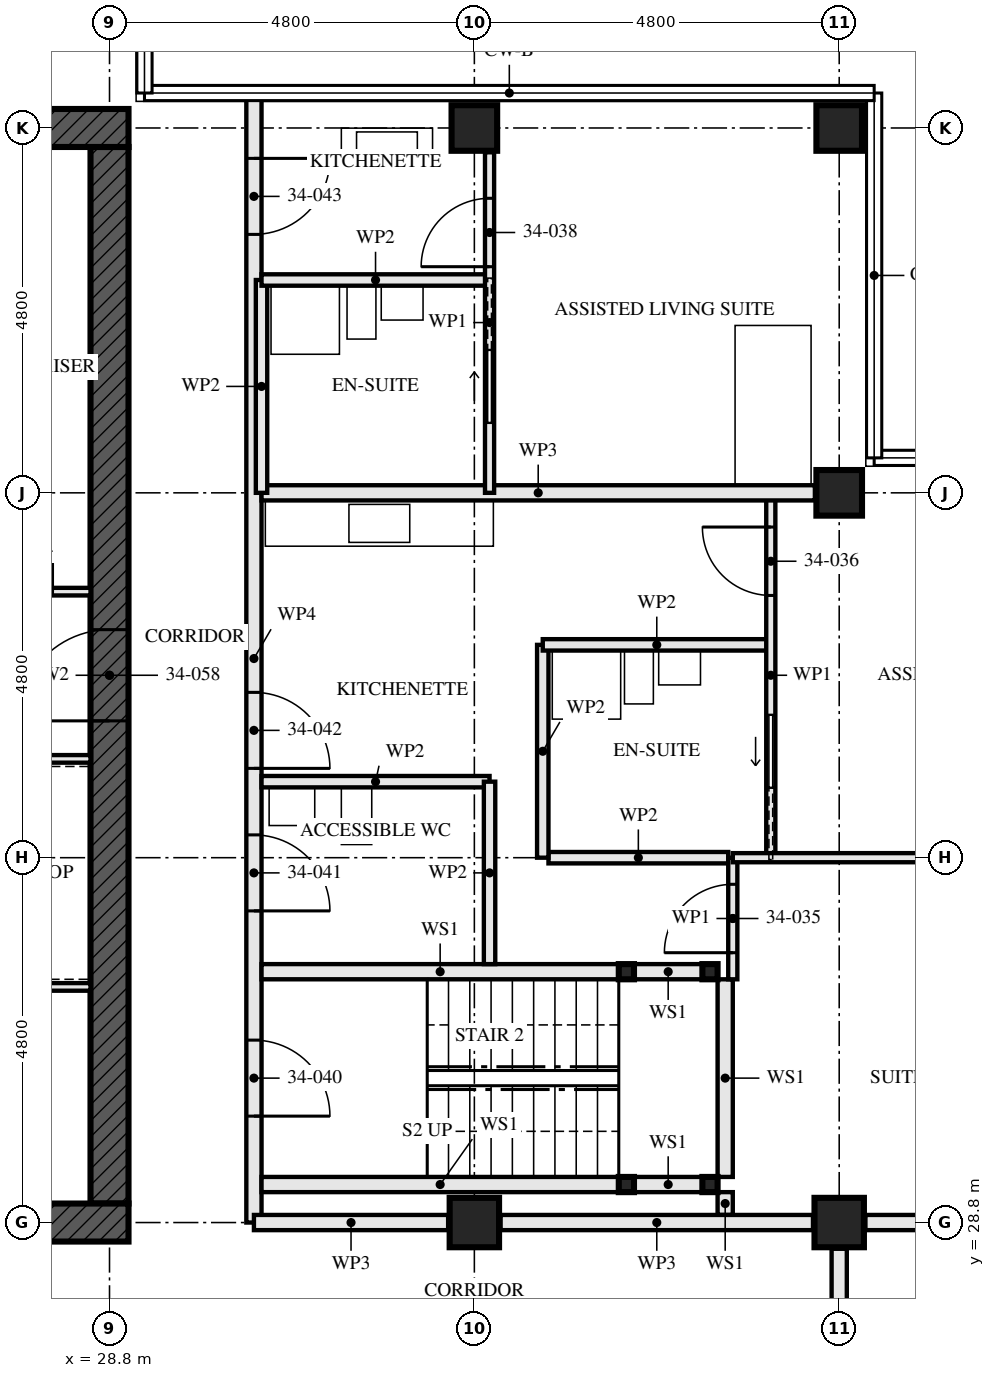
"""IFC4 building model, lengths in metres.
Left out: names, types, materials, properties, quantities, classifications, styles, units other than length and angle.
Written with IfcOpenShell. Run it as: python <this file> out.ifc"""

import sys

from ifc_helpers import new_model, si_unit, direction, frame, frame_2d, origin, origin_2d, place, context, subcontext, project, spatial, rectangle, hollow_rectangle, extrude, element, fill, save


model = new_model("IFC4")
c1 = context("Model", 3, precision=1e-05, world=origin(), true_north=direction((0.0, 1.0)))
c2 = subcontext(c1, "Body", "Model", "MODEL_VIEW")
j1 = project(units=[si_unit("LENGTHUNIT", "METRE"), si_unit("PLANEANGLEUNIT", "RADIAN")], contexts=[c1])
p1 = place(None, origin())
s1 = spatial("IfcSite", under=j1, at=p1, CompositionType="ELEMENT")
p2 = place(p1, origin())
s2 = spatial("IfcBuilding", under=s1, at=p2, CompositionType="ELEMENT")
p3 = place(p2, frame((0.0, 0.0, 126.0)))
s3 = spatial("IfcBuildingStorey", under=s2, at=p3, CompositionType="ELEMENT", Elevation=126.0)
p4 = place(p3, frame((33.6, 28.8, 0.0), z_axis=(0.0, 0.0, 1.0), x_axis=(0.0, 1.0, 0.0)))
e1 = element("IfcColumn", 1, at=p4, inside=s3, PredefinedType="COLUMN", context=c2, shape_type="SweptSolid", body=[
    extrude(hollow_rectangle(XDim=0.65, YDim=0.65, WallThickness=0.05, at=origin_2d()), origin(), (0.0, 0.0, 1.0), 3.5),
])
p5 = place(p3, frame((33.6, 43.2, 0.0), z_axis=(0.0, 0.0, 1.0), x_axis=(0.0, 1.0, 0.0)))
e2 = element("IfcColumn", 2, at=p5, inside=s3, PredefinedType="COLUMN", context=c2, shape_type="SweptSolid", body=[
    extrude(hollow_rectangle(XDim=0.6, YDim=0.6, WallThickness=0.08, at=origin_2d()), origin(), (0.0, 0.0, 1.0), 3.5),
])
p6 = place(p3, frame((38.4, 28.8, 0.0), z_axis=(0.0, 0.0, 1.0), x_axis=(0.0, 1.0, 0.0)))
e3 = element("IfcColumn", 3, at=p6, inside=s3, PredefinedType="COLUMN", context=c2, shape_type="SweptSolid", body=[
    extrude(hollow_rectangle(XDim=0.65, YDim=0.65, WallThickness=0.05, at=origin_2d()), origin(), (0.0, 0.0, 1.0), 3.5),
])
for number, where, z_axis, x_axis in (
    (4, (38.4, 38.4, 0.0), (0.0, 0.0, 1.0), (0.0, 1.0, 0.0)),
    (5, (38.4, 43.2, 0.0), (0.0, 0.0, 1.0), (0.0, 1.0, 0.0)),
):
    element("IfcColumn", number, at=place(p3, frame(where, z_axis=z_axis, x_axis=x_axis)), inside=s3, PredefinedType="COLUMN", context=c2, shape_type="SweptSolid", body=[
        extrude(hollow_rectangle(XDim=0.6, YDim=0.6, WallThickness=0.08, at=origin_2d()), origin(), (0.0, 0.0, 1.0), 3.5),
    ])
p7 = place(p3, frame((14.15, 28.8, -0.17), z_axis=(0.0, 0.0, 1.0), x_axis=(1.0, 0.0, 0.0)))
e6 = element("IfcWall", 6, at=p7, inside=s3, PredefinedType="SHEAR", context=c2, shape_type="SweptSolid", body=[
    extrude(rectangle(XDim=14.9, YDim=0.5, at=frame_2d((7.45, 0.0))), origin(), (0.0, 0.0, 1.0), 3.5),
])
p8 = place(p7, frame((6.85, 0.0, 0.17)))
e7 = element("IfcOpeningElement", 7, at=p8, cuts=e6, PredefinedType="OPENING", context=c2, shape_type="SweptSolid", body=[
    extrude(rectangle(XDim=1.2, YDim=2.1, at=frame_2d((0.6, 1.05))), frame((0.0, 0.26, 0.0), z_axis=(0.0, -1.0, 0.0), x_axis=(1.0, 0.0, 0.0)), (0.0, 0.0, 1.0), 0.521),
])
p9 = place(p3, frame((29.05, 43.2, -0.17), z_axis=(0.0, 0.0, 1.0), x_axis=(-1.0, 0.0, 0.0)))
e8 = element("IfcWall", 8, at=p9, inside=s3, PredefinedType="SHEAR", context=c2, shape_type="SweptSolid", body=[
    extrude(rectangle(XDim=14.9, YDim=0.5, at=frame_2d((7.45, 0.0))), origin(), (0.0, 0.0, 1.0), 3.5),
])
p10 = place(p9, frame((6.85, 0.0, 0.17)))
e9 = element("IfcOpeningElement", 9, at=p10, cuts=e8, PredefinedType="OPENING", context=c2, shape_type="SweptSolid", body=[
    extrude(rectangle(XDim=1.2, YDim=2.1, at=frame_2d((0.6, 1.05))), frame((0.0, 0.26, 0.0), z_axis=(0.0, -1.0, 0.0), x_axis=(1.0, 0.0, 0.0)), (0.0, 0.0, 1.0), 0.521),
])
p11 = place(p3, frame((28.8, 29.05, -0.17), z_axis=(0.0, 0.0, 1.0), x_axis=(0.0, 1.0, 0.0)))
e10 = element("IfcWall", 10, at=p11, inside=s3, PredefinedType="SHEAR", context=c2, shape_type="SweptSolid", body=[
    extrude(rectangle(XDim=13.9, YDim=0.5, at=frame_2d((6.95, 0.0))), origin(), (0.0, 0.0, 1.0), 3.5),
])
p12 = place(p11, frame((6.35, 0.0, 0.17)))
e11 = element("IfcOpeningElement", 11, at=p12, cuts=e10, PredefinedType="OPENING", context=c2, shape_type="SweptSolid", body=[
    extrude(rectangle(XDim=1.2, YDim=2.1, at=frame_2d((0.6, 1.05))), frame((0.0, 0.26, 0.0), z_axis=(0.0, -1.0, 0.0), x_axis=(1.0, 0.0, 0.0)), (0.0, 0.0, 1.0), 0.521),
])
for number, where, z_axis, x_axis in (
    (12, (36.7, 29.3, 0.0), (0.0, 0.0, 1.0), (1.0, 0.0, 0.0)),
    (13, (36.7, 32.1, 0.0), (0.0, 0.0, 1.0), (1.0, 0.0, 0.0)),
    (14, (35.6, 29.3, 0.0), (0.0, 0.0, 1.0), (1.0, 0.0, 0.0)),
    (15, (35.6, 32.1, 0.0), (0.0, 0.0, 1.0), (1.0, 0.0, 0.0)),
):
    element("IfcColumn", number, at=place(p3, frame(where, z_axis=z_axis, x_axis=x_axis)), inside=s3, PredefinedType="COLUMN", context=c2, shape_type="SweptSolid", body=[
        extrude(hollow_rectangle(XDim=0.2, YDim=0.2, WallThickness=0.008, at=origin_2d()), origin(), (0.0, 0.0, 1.0), 3.33),
    ])
p13 = place(p3, frame((38.4, 26.8, 0.0), z_axis=(0.0, 0.0, 1.0), x_axis=(0.0, 1.0, 0.0)))
e16 = element("IfcWall", 16, at=p13, inside=s3, PredefinedType="PARTITIONING", context=c2, shape_type="SweptSolid", body=[
    extrude(rectangle(XDim=1.655, YDim=0.2, at=frame_2d((0.828, 0.0))), origin(), (0.0, 0.0, 1.0), 3.33),
])
p14 = place(p3, frame((36.6, 29.3, 0.0), z_axis=(0.0, 0.0, 1.0), x_axis=(-1.0, 0.0, 0.0)))
e17 = element("IfcWall", 17, at=p14, inside=s3, PredefinedType="SOLIDWALL", context=c2, shape_type="SweptSolid", body=[
    extrude(rectangle(XDim=0.9, YDim=0.2, at=frame_2d((0.45, 0.0))), origin(), (0.0, 0.0, 1.0), 2.99),
])
p15 = place(p3, frame((35.5, 29.3, 0.0), z_axis=(0.0, 0.0, 1.0), x_axis=(-1.0, 0.0, 0.0)))
e18 = element("IfcWall", 18, at=p15, inside=s3, PredefinedType="SOLIDWALL", context=c2, shape_type="SweptSolid", body=[
    extrude(rectangle(XDim=4.7, YDim=0.2, at=frame_2d((2.35, 0.0))), origin(), (0.0, 0.0, 1.0), 2.99),
])
p16 = place(p3, frame((36.6, 32.1, 0.0), z_axis=(0.0, 0.0, 1.0), x_axis=(-1.0, 0.0, 0.0)))
e19 = element("IfcWall", 19, at=p16, inside=s3, PredefinedType="SOLIDWALL", context=c2, shape_type="SweptSolid", body=[
    extrude(rectangle(XDim=0.9, YDim=0.2, at=frame_2d((0.45, 0.0))), origin(), (0.0, 0.0, 1.0), 2.99),
])
p17 = place(p3, frame((35.5, 32.1, 0.0), z_axis=(0.0, 0.0, 1.0), x_axis=(-1.0, 0.0, 0.0)))
e20 = element("IfcWall", 20, at=p17, inside=s3, PredefinedType="SOLIDWALL", context=c2, shape_type="SweptSolid", body=[
    extrude(rectangle(XDim=4.7, YDim=0.2, at=frame_2d((2.35, 0.0))), origin(), (0.0, 0.0, 1.0), 2.99),
])
p18 = place(p3, frame((36.9, 28.9, 0.0), z_axis=(0.0, 0.0, 1.0), x_axis=(0.0, 1.0, 0.0)))
e21 = element("IfcWall", 21, at=p18, inside=s3, PredefinedType="SOLIDWALL", context=c2, shape_type="SweptSolid", body=[
    extrude(rectangle(XDim=0.3, YDim=0.2, at=frame_2d((0.15, 0.0))), origin(), (0.0, 0.0, 1.0), 3.33),
])
p19 = place(p3, frame((36.9, 29.4, 0.0), z_axis=(0.0, 0.0, 1.0), x_axis=(0.0, 1.0, 0.0)))
e22 = element("IfcWall", 22, at=p19, inside=s3, PredefinedType="SOLIDWALL", context=c2, shape_type="SweptSolid", body=[
    extrude(rectangle(XDim=2.6, YDim=0.2, at=frame_2d((1.3, 0.0))), origin(), (0.0, 0.0, 1.0), 3.33),
])
p20 = place(p3, frame((33.8, 32.2, 0.0), z_axis=(0.0, 0.0, 1.0), x_axis=(0.0, 1.0, 0.0)))
e23 = element("IfcWall", 23, at=p20, inside=s3, PredefinedType="PARTITIONING", context=c2, shape_type="SweptSolid", body=[
    extrude(rectangle(XDim=2.4, YDim=0.15, at=frame_2d((1.2, 0.0))), origin(), (0.0, 0.0, 1.0), 2.55),
])
for number, where, z_axis, x_axis in (
    (24, (33.8, 34.6, 0.0), (0.0, 0.0, 1.0), (-1.0, 0.0, 0.0)),
    (25, (37.5, 36.4, 0.0), (0.0, 0.0, 1.0), (-1.0, 0.0, 0.0)),
):
    element("IfcWall", number, at=place(p3, frame(where, z_axis=z_axis, x_axis=x_axis)), inside=s3, PredefinedType="PARTITIONING", context=c2, shape_type="SweptSolid", body=[
        extrude(rectangle(XDim=3.0, YDim=0.15, at=frame_2d((1.5, 0.0))), origin(), (0.0, 0.0, 1.0), 3.33),
    ])
p21 = place(p3, frame((34.5, 33.6, 0.0), z_axis=(0.0, 0.0, 1.0), x_axis=(0.0, 1.0, 0.0)))
e26 = element("IfcWall", 26, at=p21, inside=s3, PredefinedType="PARTITIONING", context=c2, shape_type="SweptSolid", body=[
    extrude(rectangle(XDim=2.8, YDim=0.15, at=frame_2d((1.4, 0.0))), origin(), (0.0, 0.0, 1.0), 3.33),
])
p22 = place(p3, frame((37.0, 32.0, 0.0), z_axis=(0.0, 0.0, 1.0), x_axis=(0.0, 1.0, 0.0)))
e27 = element("IfcWall", 27, at=p22, inside=s3, PredefinedType="PARTITIONING", context=c2, shape_type="SweptSolid", body=[
    extrude(rectangle(XDim=1.6, YDim=0.12, at=frame_2d((0.8, 0.0))), origin(), (0.0, 0.0, 1.0), 3.33),
])
p23 = place(p22, frame((0.35, 0.0, 0.0)))
e28 = element("IfcOpeningElement", 28, at=p23, cuts=e27, PredefinedType="OPENING", context=c2, shape_type="SweptSolid", body=[
    extrude(rectangle(XDim=0.9, YDim=2.1, at=frame_2d((0.45, 1.05))), frame((0.0, 0.071, 0.0), z_axis=(0.0, -1.0, 0.0), x_axis=(1.0, 0.0, 0.0)), (0.0, 0.0, 1.0), 0.141),
])
p24 = place(p3, frame((37.5, 33.6, 0.0), z_axis=(0.0, 0.0, 1.0), x_axis=(0.0, 1.0, 0.0)))
e29 = element("IfcWall", 29, at=p24, inside=s3, PredefinedType="PARTITIONING", context=c2, shape_type="SweptSolid", body=[
    extrude(rectangle(XDim=4.8, YDim=0.12, at=frame_2d((2.4, 0.0))), origin(), (0.0, 0.0, 1.0), 3.33),
])
p25 = place(p24, frame((3.45, 0.0, 0.0)))
e30 = element("IfcOpeningElement", 30, at=p25, cuts=e29, PredefinedType="OPENING", context=c2, shape_type="SweptSolid", body=[
    extrude(rectangle(XDim=0.9, YDim=2.1, at=frame_2d((0.45, 1.05))), frame((0.0, 0.071, 0.0), z_axis=(0.0, -1.0, 0.0), x_axis=(1.0, 0.0, 0.0)), (0.0, 0.0, 1.0), 0.141),
])
p26 = place(p24, frame((0.925, 0.0, 0.0)))
e31 = element("IfcOpeningElement", 31, at=p26, cuts=e29, PredefinedType="OPENING", context=c2, shape_type="SweptSolid", body=[
    extrude(rectangle(XDim=0.95, YDim=2.1, at=frame_2d((0.475, 1.05))), frame((0.0, 0.071, 0.0), z_axis=(0.0, -1.0, 0.0), x_axis=(1.0, 0.0, 0.0)), (0.0, 0.0, 1.0), 0.141),
])
p27 = place(p3, frame((42.88, 33.6, 0.0), z_axis=(0.0, 0.0, 1.0), x_axis=(-1.0, 0.0, 0.0)))
e32 = element("IfcWall", 32, at=p27, inside=s3, PredefinedType="PARTITIONING", context=c2, shape_type="SweptSolid", body=[
    extrude(rectangle(XDim=5.88, YDim=0.12, at=frame_2d((2.94, 0.0))), origin(), (0.0, 0.0, 1.0), 2.55),
])
p28 = place(p3, frame((38.08, 38.4, 0.0), z_axis=(0.0, 0.0, 1.0), x_axis=(-1.0, 0.0, 0.0)))
e33 = element("IfcWall", 33, at=p28, inside=s3, PredefinedType="PARTITIONING", context=c2, shape_type="SweptSolid", body=[
    extrude(rectangle(XDim=7.28, YDim=0.2, at=frame_2d((3.64, 0.0))), origin(), (0.0, 0.0, 1.0), 2.55),
])
p29 = place(p3, frame((33.8, 41.2, 0.0), z_axis=(0.0, 0.0, 1.0), x_axis=(-1.0, 0.0, 0.0)))
e34 = element("IfcWall", 34, at=p29, inside=s3, PredefinedType="PARTITIONING", context=c2, shape_type="SweptSolid", body=[
    extrude(rectangle(XDim=3.0, YDim=0.15, at=frame_2d((1.5, 0.0))), origin(), (0.0, 0.0, 1.0), 3.33),
])
p30 = place(p3, frame((30.8, 38.4, 0.0), z_axis=(0.0, 0.0, 1.0), x_axis=(0.0, 1.0, 0.0)))
e35 = element("IfcWall", 35, at=p30, inside=s3, PredefinedType="PARTITIONING", context=c2, shape_type="SweptSolid", body=[
    extrude(rectangle(XDim=2.8, YDim=0.15, at=frame_2d((1.4, 0.0))), origin(), (0.0, 0.0, 1.0), 3.33),
])
p31 = place(p3, frame((33.8, 38.4, 0.0), z_axis=(0.0, 0.0, 1.0), x_axis=(0.0, 1.0, 0.0)))
e36 = element("IfcWall", 36, at=p31, inside=s3, PredefinedType="PARTITIONING", context=c2, shape_type="SweptSolid", body=[
    extrude(rectangle(XDim=4.48, YDim=0.12, at=frame_2d((2.24, 0.0))), origin(), (0.0, 0.0, 1.0), 3.33),
])
p32 = place(p31, frame((2.975, 0.0, 0.0)))
e37 = element("IfcOpeningElement", 37, at=p32, cuts=e36, PredefinedType="OPENING", context=c2, shape_type="SweptSolid", body=[
    extrude(rectangle(XDim=0.9, YDim=2.1, at=frame_2d((0.45, 1.05))), frame((0.0, 0.071, 0.0), z_axis=(0.0, -1.0, 0.0), x_axis=(1.0, 0.0, 0.0)), (0.0, 0.0, 1.0), 0.141),
])
p33 = place(p31, frame((0.925, 0.0, 0.0)))
e38 = element("IfcOpeningElement", 38, at=p33, cuts=e36, PredefinedType="OPENING", context=c2, shape_type="SweptSolid", body=[
    extrude(rectangle(XDim=0.95, YDim=2.1, at=frame_2d((0.475, 1.05))), frame((0.0, 0.071, 0.0), z_axis=(0.0, -1.0, 0.0), x_axis=(1.0, 0.0, 0.0)), (0.0, 0.0, 1.0), 0.141),
])
p34 = place(p3, frame((30.7, 28.8, 0.0), z_axis=(0.0, 0.0, 1.0), x_axis=(0.0, 1.0, 0.0)))
e39 = element("IfcWall", 39, at=p34, inside=s3, PredefinedType="PARTITIONING", context=c2, shape_type="SweptSolid", body=[
    extrude(rectangle(XDim=14.84, YDim=0.2, at=frame_2d((7.42, 0.0))), origin(), (0.0, 0.0, 1.0), 2.32),
])
p35 = place(p34, frame((1.4, 0.0, 0.0)))
e40 = element("IfcOpeningElement", 40, at=p35, cuts=e39, PredefinedType="OPENING", context=c2, shape_type="SweptSolid", body=[
    extrude(rectangle(XDim=1.0, YDim=2.1, at=frame_2d((0.5, 1.05))), frame((0.0, 0.111, 0.0), z_axis=(0.0, -1.0, 0.0), x_axis=(1.0, 0.0, 0.0)), (0.0, 0.0, 1.0), 0.221),
])
p36 = place(p34, frame((4.1, 0.0, 0.0)))
e41 = element("IfcOpeningElement", 41, at=p36, cuts=e39, PredefinedType="OPENING", context=c2, shape_type="SweptSolid", body=[
    extrude(rectangle(XDim=1.0, YDim=2.1, at=frame_2d((0.5, 1.05))), frame((0.0, 0.111, 0.0), z_axis=(0.0, -1.0, 0.0), x_axis=(1.0, 0.0, 0.0)), (0.0, 0.0, 1.0), 0.221),
])
p37 = place(p34, frame((5.975, 0.0, 0.0)))
e42 = element("IfcOpeningElement", 42, at=p37, cuts=e39, PredefinedType="OPENING", context=c2, shape_type="SweptSolid", body=[
    extrude(rectangle(XDim=1.0, YDim=2.1, at=frame_2d((0.5, 1.05))), frame((0.0, 0.111, 0.0), z_axis=(0.0, -1.0, 0.0), x_axis=(1.0, 0.0, 0.0)), (0.0, 0.0, 1.0), 0.221),
])
p38 = place(p34, frame((13.0, 0.0, 0.0)))
e43 = element("IfcOpeningElement", 43, at=p38, cuts=e39, PredefinedType="OPENING", context=c2, shape_type="SweptSolid", body=[
    extrude(rectangle(XDim=1.0, YDim=2.1, at=frame_2d((0.5, 1.05))), frame((0.0, 0.111, 0.0), z_axis=(0.0, -1.0, 0.0), x_axis=(1.0, 0.0, 0.0)), (0.0, 0.0, 1.0), 0.221),
])
p39 = place(p3, frame((23.05, 34.9, 0.0), z_axis=(0.0, 0.0, 1.0), x_axis=(1.0, 0.0, 0.0)))
e44 = element("IfcWall", 44, at=p39, inside=s3, PredefinedType="SOLIDWALL", context=c2, shape_type="SweptSolid", body=[
    extrude(rectangle(XDim=5.5, YDim=0.1, at=frame_2d((2.75, 0.0))), origin(), (0.0, 0.0, 1.0), 3.33),
])
p40 = place(p3, frame((22.65, 37.1, 0.0), z_axis=(0.0, 0.0, 1.0), x_axis=(1.0, 0.0, 0.0)))
e45 = element("IfcWall", 45, at=p40, inside=s3, PredefinedType="SOLIDWALL", context=c2, shape_type="SweptSolid", body=[
    extrude(rectangle(XDim=5.9, YDim=0.1, at=frame_2d((2.95, 0.0))), origin(), (0.0, 0.0, 1.0), 3.33),
])
p41 = place(p40, frame((3.1, 0.0, 0.0)))
e46 = element("IfcOpeningElement", 46, at=p41, cuts=e45, PredefinedType="OPENING", context=c2, shape_type="SweptSolid", body=[
    extrude(rectangle(XDim=1.0, YDim=2.1, at=frame_2d((0.5, 1.05))), frame((0.0, 0.061, 0.0), z_axis=(0.0, -1.0, 0.0), x_axis=(1.0, 0.0, 0.0)), (0.0, 0.0, 1.0), 0.121),
])
p42 = place(p40, frame((4.7, 0.0, 0.0)))
e47 = element("IfcOpeningElement", 47, at=p42, cuts=e45, PredefinedType="OPENING", context=c2, shape_type="SweptSolid", body=[
    extrude(rectangle(XDim=0.7, YDim=2.1, at=frame_2d((0.35, 1.05))), frame((0.0, 0.061, 0.0), z_axis=(0.0, -1.0, 0.0), x_axis=(1.0, 0.0, 0.0)), (0.0, 0.0, 1.0), 0.121),
])
p43 = place(p3, frame((23.15, 31.9, 0.0), z_axis=(0.0, 0.0, 1.0), x_axis=(1.0, 0.0, 0.0)))
e48 = element("IfcWall", 48, at=p43, inside=s3, PredefinedType="SOLIDWALL", context=c2, shape_type="SweptSolid", body=[
    extrude(rectangle(XDim=5.4, YDim=0.1, at=frame_2d((2.7, 0.0))), origin(), (0.0, 0.0, 1.0), 3.33),
])
p44 = place(p3, frame((42.88, 28.8, 0.0), z_axis=(0.0, 0.0, 1.0), x_axis=(-1.0, 0.0, 0.0)))
e49 = element("IfcWall", 49, at=p44, inside=s3, PredefinedType="PARTITIONING", context=c2, shape_type="SweptSolid", body=[
    extrude(rectangle(XDim=4.135, YDim=0.2, at=frame_2d((2.067, 0.0))), origin(), (0.0, 0.0, 1.0), 2.32),
])
p45 = place(p3, frame((38.055, 28.8, 0.0), z_axis=(0.0, 0.0, 1.0), x_axis=(-1.0, 0.0, 0.0)))
e50 = element("IfcWall", 50, at=p45, inside=s3, PredefinedType="PARTITIONING", context=c2, shape_type="SweptSolid", body=[
    extrude(rectangle(XDim=4.11, YDim=0.2, at=frame_2d((2.055, 0.0))), origin(), (0.0, 0.0, 1.0), 2.32),
])
p46 = place(p3, frame((33.255, 28.8, 0.0), z_axis=(0.0, 0.0, 1.0), x_axis=(-1.0, 0.0, 0.0)))
e51 = element("IfcWall", 51, at=p46, inside=s3, PredefinedType="PARTITIONING", context=c2, shape_type="SweptSolid", body=[
    extrude(rectangle(XDim=2.555, YDim=0.2, at=frame_2d((1.277, 0.0))), origin(), (0.0, 0.0, 1.0), 2.32),
])
p47 = place(p3, frame((36.94, 33.6, 0.0), z_axis=(0.0, 0.0, 1.0), x_axis=(-1.0, 0.0, 0.0)))
e52 = element("IfcWall", 52, at=p47, inside=s3, PredefinedType="PARTITIONING", context=c2, shape_type="SweptSolid", body=[
    extrude(rectangle(XDim=2.365, YDim=0.15, at=frame_2d((1.183, 0.0))), origin(), (0.0, 0.0, 1.0), 2.55),
])
p48 = place(p23, origin())
e53 = element("IfcDoor", 53, at=p48, inside=s3, OperationType="SINGLE_SWING_RIGHT", PredefinedType="DOOR", context=c2, shape_type="SweptSolid", body=[
    extrude(rectangle(XDim=0.9, YDim=2.1, at=frame_2d((0.45, 1.05))), frame((0.0, 0.022, 0.0), z_axis=(0.0, -1.0, 0.0), x_axis=(1.0, 0.0, 0.0)), (0.0, 0.0, 1.0), 0.044),
])
fill(e28, e53)
p49 = place(p25, origin())
e54 = element("IfcDoor", 54, at=p49, inside=s3, OperationType="SINGLE_SWING_LEFT", PredefinedType="DOOR", context=c2, shape_type="SweptSolid", body=[
    extrude(rectangle(XDim=0.9, YDim=2.1, at=frame_2d((0.45, 1.05))), frame((0.0, 0.022, 0.0), z_axis=(0.0, -1.0, 0.0), x_axis=(1.0, 0.0, 0.0)), (0.0, 0.0, 1.0), 0.044),
])
fill(e30, e54)
p50 = place(p26, origin())
e55 = element("IfcDoor", 55, at=p50, inside=s3, OperationType="SLIDING_TO_RIGHT", PredefinedType="DOOR", context=c2, shape_type="SweptSolid", body=[
    extrude(rectangle(XDim=0.95, YDim=2.1, at=frame_2d((0.475, 1.05))), frame((0.0, 0.022, 0.0), z_axis=(0.0, -1.0, 0.0), x_axis=(1.0, 0.0, 0.0)), (0.0, 0.0, 1.0), 0.044),
])
fill(e31, e55)
p51 = place(p32, origin())
e56 = element("IfcDoor", 56, at=p51, inside=s3, OperationType="SINGLE_SWING_RIGHT", PredefinedType="DOOR", context=c2, shape_type="SweptSolid", body=[
    extrude(rectangle(XDim=0.9, YDim=2.1, at=frame_2d((0.45, 1.05))), frame((0.0, 0.022, 0.0), z_axis=(0.0, -1.0, 0.0), x_axis=(1.0, 0.0, 0.0)), (0.0, 0.0, 1.0), 0.044),
])
fill(e37, e56)
p52 = place(p33, origin())
e57 = element("IfcDoor", 57, at=p52, inside=s3, OperationType="SLIDING_TO_LEFT", PredefinedType="DOOR", context=c2, shape_type="SweptSolid", body=[
    extrude(rectangle(XDim=0.95, YDim=2.1, at=frame_2d((0.475, 1.05))), frame((0.0, 0.022, 0.0), z_axis=(0.0, -1.0, 0.0), x_axis=(1.0, 0.0, 0.0)), (0.0, 0.0, 1.0), 0.044),
])
fill(e38, e57)
p53 = place(p35, frame((1.0, 0.0, 0.0), z_axis=(0.0, 0.0, 1.0), x_axis=(-1.0, 0.0, 0.0)))
e58 = element("IfcDoor", 58, at=p53, inside=s3, OperationType="SINGLE_SWING_LEFT", PredefinedType="DOOR", context=c2, shape_type="SweptSolid", body=[
    extrude(rectangle(XDim=1.0, YDim=2.1, at=frame_2d((0.5, 1.05))), frame((0.0, 0.032, 0.0), z_axis=(0.0, -1.0, 0.0), x_axis=(1.0, 0.0, 0.0)), (0.0, 0.0, 1.0), 0.064),
])
fill(e40, e58)
p54 = place(p36, frame((1.0, 0.0, 0.0), z_axis=(0.0, 0.0, 1.0), x_axis=(-1.0, 0.0, 0.0)))
e59 = element("IfcDoor", 59, at=p54, inside=s3, OperationType="SINGLE_SWING_LEFT", PredefinedType="DOOR", context=c2, shape_type="SweptSolid", body=[
    extrude(rectangle(XDim=1.0, YDim=2.1, at=frame_2d((0.5, 1.05))), frame((0.0, 0.027, 0.0), z_axis=(0.0, -1.0, 0.0), x_axis=(1.0, 0.0, 0.0)), (0.0, 0.0, 1.0), 0.054),
])
fill(e41, e59)
p55 = place(p37, frame((1.0, 0.0, 0.0), z_axis=(0.0, 0.0, 1.0), x_axis=(-1.0, 0.0, 0.0)))
e60 = element("IfcDoor", 60, at=p55, inside=s3, OperationType="SINGLE_SWING_LEFT", PredefinedType="DOOR", context=c2, shape_type="SweptSolid", body=[
    extrude(rectangle(XDim=1.0, YDim=2.1, at=frame_2d((0.5, 1.05))), frame((0.0, 0.027, 0.0), z_axis=(0.0, -1.0, 0.0), x_axis=(1.0, 0.0, 0.0)), (0.0, 0.0, 1.0), 0.054),
])
fill(e42, e60)
p56 = place(p38, frame((1.0, 0.0, 0.0), z_axis=(0.0, 0.0, 1.0), x_axis=(-1.0, 0.0, 0.0)))
e61 = element("IfcDoor", 61, at=p56, inside=s3, OperationType="SINGLE_SWING_RIGHT", PredefinedType="DOOR", context=c2, shape_type="SweptSolid", body=[
    extrude(rectangle(XDim=1.0, YDim=2.1, at=frame_2d((0.5, 1.05))), frame((0.0, 0.027, 0.0), z_axis=(0.0, -1.0, 0.0), x_axis=(1.0, 0.0, 0.0)), (0.0, 0.0, 1.0), 0.054),
])
fill(e43, e61)
p57 = place(p12, origin())
e62 = element("IfcDoor", 62, at=p57, inside=s3, OperationType="SINGLE_SWING_LEFT", PredefinedType="DOOR", context=c2, shape_type="SweptSolid", body=[
    extrude(rectangle(XDim=1.2, YDim=2.1, at=frame_2d((0.6, 1.05))), frame((0.0, 0.027, 0.0), z_axis=(0.0, -1.0, 0.0), x_axis=(1.0, 0.0, 0.0)), (0.0, 0.0, 1.0), 0.054),
])
fill(e11, e62)
save(model, sys.argv[1])
